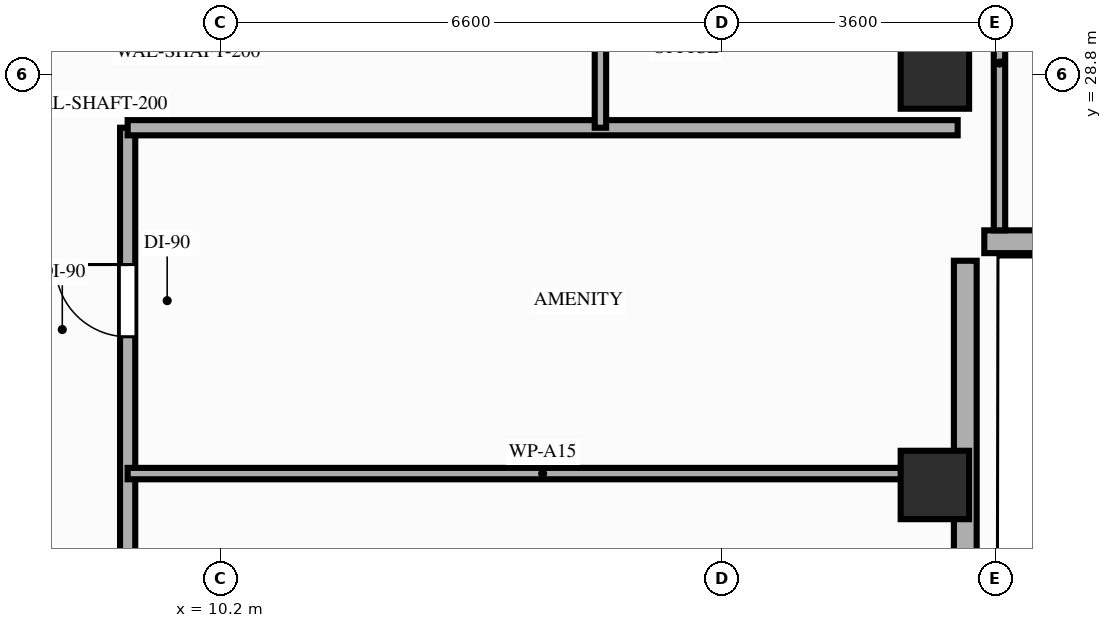
"""IFC4 building model, lengths in metres.
Left out: names, types, materials, properties, quantities, classifications, styles, units other than length and angle.
Written with IfcOpenShell. Run it as: python <this file> out.ifc"""

import sys

from ifc_helpers import new_model, si_unit, direction, frame, frame_2d, origin, origin_2d, place, context, subcontext, project, spatial, rectangle, extrude, element, fill, save


model = new_model("IFC4")
c1 = context("Model", 3, precision=1e-05, world=origin(), true_north=direction((0.0, 1.0)))
c2 = subcontext(c1, "Body", "Model", "MODEL_VIEW")
j1 = project(units=[si_unit("LENGTHUNIT", "METRE"), si_unit("PLANEANGLEUNIT", "RADIAN")], contexts=[c1])
p1 = place(None, origin())
s1 = spatial("IfcSite", under=j1, at=p1, CompositionType="ELEMENT")
p2 = place(p1, origin())
s2 = spatial("IfcBuilding", under=s1, at=p2, CompositionType="ELEMENT")
p3 = place(p2, frame((0.0, 0.0, 166.4)))
s3 = spatial("IfcBuildingStorey", under=s2, at=p3, CompositionType="ELEMENT", Elevation=166.4)
for number, where, z_axis, x_axis in (
    (1, (19.6, 23.4, 0.0), (0.0, 0.0, 1.0), (1.0, 0.0, 0.0)),
    (2, (19.6, 28.8, 0.0), (0.0, 0.0, 1.0), (1.0, 0.0, 0.0)),
):
    element("IfcColumn", number, at=place(p3, frame(where, z_axis=z_axis, x_axis=x_axis)), inside=s3, PredefinedType="COLUMN", context=c2, shape_type="SweptSolid", body=[
        extrude(rectangle(XDim=0.9, YDim=0.9, at=origin_2d()), origin(), (0.0, 0.0, 1.0), 3.2),
    ])
p4 = place(p3, frame((20.0, 8.8, 0.0), z_axis=(0.0, 0.0, 1.0), x_axis=(0.0, 1.0, 0.0)))
e3 = element("IfcWall", 3, at=p4, inside=s3, PredefinedType="STANDARD", context=c2, shape_type="SweptSolid", body=[
    extrude(rectangle(XDim=17.55, YDim=0.3, at=frame_2d((8.775, 0.0))), origin(), (0.0, 0.0, 1.0), 2.45),
])
p5 = place(p4, frame((4.58, 0.0, 0.85)))
e4 = element("IfcOpeningElement", 4, at=p5, cuts=e3, PredefinedType="OPENING", context=c2, shape_type="SweptSolid", body=[
    extrude(rectangle(XDim=0.8, YDim=1.35, at=frame_2d((0.4, 0.675))), frame((0.0, 0.16, 0.0), z_axis=(0.0, -1.0, 0.0), x_axis=(1.0, 0.0, 0.0)), (0.0, 0.0, 1.0), 0.32),
])
p6 = place(p4, frame((10.85, 0.0, 0.85)))
e5 = element("IfcOpeningElement", 5, at=p6, cuts=e3, PredefinedType="OPENING", context=c2, shape_type="SweptSolid", body=[
    extrude(rectangle(XDim=2.1, YDim=1.35, at=frame_2d((1.05, 0.675))), frame((0.0, 0.16, 0.0), z_axis=(0.0, -1.0, 0.0), x_axis=(1.0, 0.0, 0.0)), (0.0, 0.0, 1.0), 0.32),
])
p7 = place(p3, frame((20.25, 26.6, 0.0), z_axis=(0.0, 0.0, 1.0), x_axis=(1.0, 0.0, 0.0)))
e6 = element("IfcWall", 6, at=p7, inside=s3, PredefinedType="STANDARD", context=c2, shape_type="SweptSolid", body=[
    extrude(rectangle(XDim=10.55, YDim=0.3, at=frame_2d((5.275, 0.0))), origin(), (0.0, 0.0, 1.0), 3.02),
])
p8 = place(p3, frame((8.98, 14.5, 0.0), z_axis=(0.0, 0.0, 1.0), x_axis=(0.0, 1.0, 0.0)))
e7 = element("IfcWall", 7, at=p8, inside=s3, PredefinedType="PARTITIONING", context=c2, shape_type="SweptSolid", body=[
    extrude(rectangle(XDim=13.6, YDim=0.2, at=frame_2d((6.8, 0.0))), origin(), (0.0, 0.0, 1.0), 2.45),
])
p9 = place(p8, frame((0.24, 0.0, 0.0)))
e8 = element("IfcOpeningElement", 8, at=p9, cuts=e7, PredefinedType="OPENING", context=c2, shape_type="SweptSolid", body=[
    extrude(rectangle(XDim=0.95, YDim=2.1, at=frame_2d((0.475, 1.05))), frame((0.0, 0.11, 0.0), z_axis=(0.0, -1.0, 0.0), x_axis=(1.0, 0.0, 0.0)), (0.0, 0.0, 1.0), 0.22),
])
p10 = place(p8, frame((4.7, 0.0, 0.0)))
e9 = element("IfcOpeningElement", 9, at=p10, cuts=e7, PredefinedType="OPENING", context=c2, shape_type="SweptSolid", body=[
    extrude(rectangle(XDim=0.95, YDim=2.15, at=frame_2d((0.475, 1.075))), frame((0.0, 0.11, 0.0), z_axis=(0.0, -1.0, 0.0), x_axis=(1.0, 0.0, 0.0)), (0.0, 0.0, 1.0), 0.22),
])
p11 = place(p8, frame((10.85, 0.0, 0.0)))
e10 = element("IfcOpeningElement", 10, at=p11, cuts=e7, PredefinedType="OPENING", context=c2, shape_type="SweptSolid", body=[
    extrude(rectangle(XDim=0.95, YDim=2.15, at=frame_2d((0.475, 1.075))), frame((0.0, 0.11, 0.0), z_axis=(0.0, -1.0, 0.0), x_axis=(1.0, 0.0, 0.0)), (0.0, 0.0, 1.0), 0.22),
])
p12 = place(p3, frame((8.98, 28.1, 0.0), z_axis=(0.0, 0.0, 1.0), x_axis=(1.0, 0.0, 0.0)))
e11 = element("IfcWall", 11, at=p12, inside=s3, PredefinedType="PARTITIONING", context=c2, shape_type="SweptSolid", body=[
    extrude(rectangle(XDim=10.92, YDim=0.2, at=frame_2d((5.46, 0.0))), origin(), (0.0, 0.0, 1.0), 2.45),
])
p13 = place(p3, frame((15.2, 28.1, 0.0), z_axis=(0.0, 0.0, 1.0), x_axis=(0.0, 1.0, 0.0)))
e12 = element("IfcWall", 12, at=p13, inside=s3, PredefinedType="PARTITIONING", context=c2, shape_type="SweptSolid", body=[
    extrude(rectangle(XDim=3.05, YDim=0.15, at=frame_2d((1.525, 0.0))), origin(), (0.0, 0.0, 1.0), 2.45),
])
p14 = place(p3, frame((8.98, 23.55, 0.0), z_axis=(0.0, 0.0, 1.0), x_axis=(1.0, 0.0, 0.0)))
e13 = element("IfcWall", 13, at=p14, inside=s3, PredefinedType="PARTITIONING", context=c2, shape_type="SweptSolid", body=[
    extrude(rectangle(XDim=10.92, YDim=0.15, at=frame_2d((5.46, 0.0))), origin(), (0.0, 0.0, 1.0), 2.45),
])
p15 = place(p3, frame((20.45, 26.75, 0.0), z_axis=(0.0, 0.0, 1.0), x_axis=(0.0, 1.0, 0.0)))
e14 = element("IfcWall", 14, at=p15, inside=s3, PredefinedType="PARTITIONING", context=c2, shape_type="SweptSolid", body=[
    extrude(rectangle(XDim=4.4, YDim=0.15, at=frame_2d((2.2, 0.0))), origin(), (0.0, 0.0, 1.0), 2.45),
])
p16 = place(p11, origin())
e15 = element("IfcDoor", 15, at=p16, inside=s3, OperationType="SINGLE_SWING_RIGHT", PredefinedType="DOOR", context=c2, shape_type="SweptSolid", body=[
    extrude(rectangle(XDim=0.95, YDim=2.15, at=frame_2d((0.475, 1.075))), frame((0.0, 0.025, 0.0), z_axis=(0.0, -1.0, 0.0), x_axis=(1.0, 0.0, 0.0)), (0.0, 0.0, 1.0), 0.05),
])
fill(e10, e15)
save(model, sys.argv[1])
